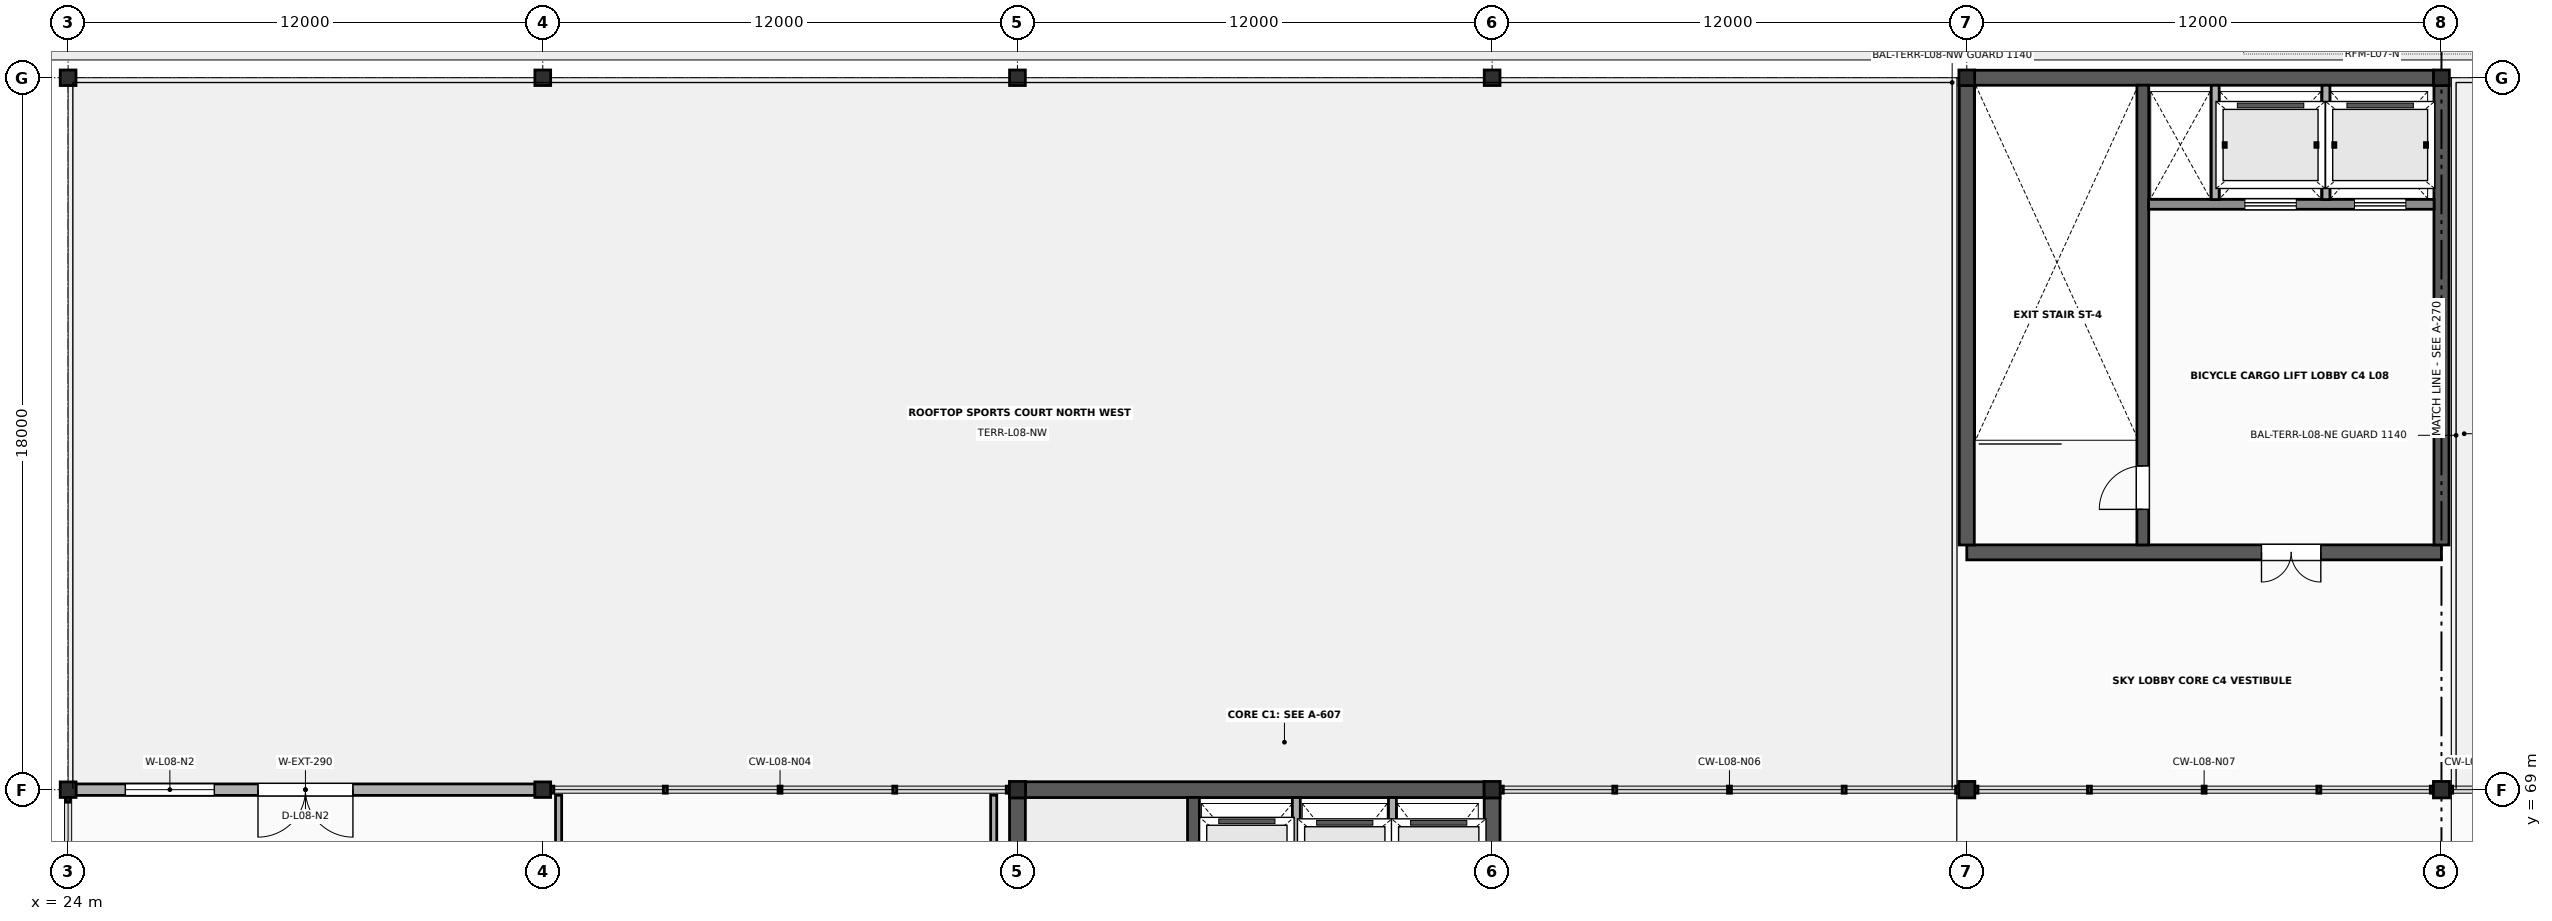
"""IFC4 building model, lengths in metres.
Left out: names, types, materials, properties, quantities, classifications, styles, units other than length and angle.
Written with IfcOpenShell. Run it as: python <this file> out.ifc"""

import sys

from ifc_helpers import new_model, si_unit, direction, frame, frame_2d, origin, origin_2d, place, context, subcontext, project, spatial, rectangle, i_section, extrude, element, fill, save


model = new_model("IFC4")
c1 = context("Model", 3, precision=1e-05, world=origin(), true_north=direction((0.0, 1.0)))
c2 = subcontext(c1, "Body", "Model", "MODEL_VIEW")
j1 = project(units=[si_unit("LENGTHUNIT", "METRE"), si_unit("PLANEANGLEUNIT", "RADIAN")], contexts=[c1])
p1 = place(None, origin())
s1 = spatial("IfcSite", under=j1, at=p1, CompositionType="ELEMENT")
p2 = place(p1, origin())
s2 = spatial("IfcBuilding", under=s1, at=p2, CompositionType="ELEMENT")
p3 = place(p2, frame((0.0, 0.0, 32.4)))
s3 = spatial("IfcBuildingStorey", under=s2, at=p3, CompositionType="ELEMENT", Elevation=32.4)
for number, where, z_axis, x_axis in (
    (1, (24.0, 69.0, 0.0), (0.0, 0.0, 1.0), (1.0, 0.0, 0.0)),
    (2, (24.0, 87.0, 0.0), (0.0, 0.0, 1.0), (1.0, 0.0, 0.0)),
    (3, (36.0, 69.0, 0.0), (0.0, 0.0, 1.0), (1.0, 0.0, 0.0)),
    (4, (36.0, 87.0, 0.0), (0.0, 0.0, 1.0), (1.0, 0.0, 0.0)),
):
    element("IfcColumn", number, at=place(p3, frame(where, z_axis=z_axis, x_axis=x_axis)), inside=s3, PredefinedType="COLUMN", context=c2, shape_type="SweptSolid", body=[
        extrude(i_section(OverallWidth=0.399, OverallDepth=0.393, WebThickness=0.023, FlangeThickness=0.037, FilletRadius=0.018, at=origin_2d()), origin(), (0.0, 0.0, 1.0), 5.2),
    ])
p4 = place(p3, frame((48.0, 69.0, 0.0), z_axis=(0.0, 0.0, 1.0), x_axis=(1.0, 0.0, 0.0)))
e5 = element("IfcColumn", 5, at=p4, inside=s3, PredefinedType="COLUMN", context=c2, shape_type="SweptSolid", body=[
    extrude(i_section(OverallWidth=0.406, OverallDepth=0.416, WebThickness=0.03, FlangeThickness=0.048, FilletRadius=0.018, at=origin_2d()), origin(), (0.0, 0.0, 1.0), 5.2),
])
p5 = place(p3, frame((48.0, 87.0, 0.0), z_axis=(0.0, 0.0, 1.0), x_axis=(1.0, 0.0, 0.0)))
e6 = element("IfcColumn", 6, at=p5, inside=s3, PredefinedType="COLUMN", context=c2, shape_type="SweptSolid", body=[
    extrude(i_section(OverallWidth=0.399, OverallDepth=0.393, WebThickness=0.023, FlangeThickness=0.037, FilletRadius=0.018, at=origin_2d()), origin(), (0.0, 0.0, 1.0), 5.2),
])
p6 = place(p3, frame((60.0, 69.0, 0.0), z_axis=(0.0, 0.0, 1.0), x_axis=(1.0, 0.0, 0.0)))
e7 = element("IfcColumn", 7, at=p6, inside=s3, PredefinedType="COLUMN", context=c2, shape_type="SweptSolid", body=[
    extrude(i_section(OverallWidth=0.406, OverallDepth=0.416, WebThickness=0.03, FlangeThickness=0.048, FilletRadius=0.018, at=origin_2d()), origin(), (0.0, 0.0, 1.0), 5.2),
])
p7 = place(p3, frame((60.0, 87.0, 0.0), z_axis=(0.0, 0.0, 1.0), x_axis=(1.0, 0.0, 0.0)))
e8 = element("IfcColumn", 8, at=p7, inside=s3, PredefinedType="COLUMN", context=c2, shape_type="SweptSolid", body=[
    extrude(i_section(OverallWidth=0.399, OverallDepth=0.393, WebThickness=0.023, FlangeThickness=0.037, FilletRadius=0.018, at=origin_2d()), origin(), (0.0, 0.0, 1.0), 5.2),
])
p8 = place(p3, frame((72.0, 69.0, 0.0), z_axis=(0.0, 0.0, 1.0), x_axis=(1.0, 0.0, 0.0)))
e9 = element("IfcColumn", 9, at=p8, inside=s3, PredefinedType="COLUMN", context=c2, shape_type="SweptSolid", body=[
    extrude(i_section(OverallWidth=0.406, OverallDepth=0.416, WebThickness=0.03, FlangeThickness=0.048, FilletRadius=0.018, at=origin_2d()), origin(), (0.0, 0.0, 1.0), 5.2),
])
p9 = place(p3, frame((72.0, 87.0, 0.0), z_axis=(0.0, 0.0, 1.0), x_axis=(1.0, 0.0, 0.0)))
e10 = element("IfcColumn", 10, at=p9, inside=s3, PredefinedType="COLUMN", context=c2, shape_type="SweptSolid", body=[
    extrude(i_section(OverallWidth=0.399, OverallDepth=0.393, WebThickness=0.023, FlangeThickness=0.037, FilletRadius=0.018, at=origin_2d()), origin(), (0.0, 0.0, 1.0), 5.2),
])
p10 = place(p3, frame((84.0, 69.0, 0.0), z_axis=(0.0, 0.0, 1.0), x_axis=(1.0, 0.0, 0.0)))
e11 = element("IfcColumn", 11, at=p10, inside=s3, PredefinedType="COLUMN", context=c2, shape_type="SweptSolid", body=[
    extrude(i_section(OverallWidth=0.406, OverallDepth=0.416, WebThickness=0.03, FlangeThickness=0.048, FilletRadius=0.018, at=origin_2d()), origin(), (0.0, 0.0, 1.0), 5.2),
])
p11 = place(p3, frame((84.0, 87.0, 0.0), z_axis=(0.0, 0.0, 1.0), x_axis=(1.0, 0.0, 0.0)))
e12 = element("IfcColumn", 12, at=p11, inside=s3, PredefinedType="COLUMN", context=c2, shape_type="SweptSolid", body=[
    extrude(i_section(OverallWidth=0.399, OverallDepth=0.393, WebThickness=0.023, FlangeThickness=0.037, FilletRadius=0.018, at=origin_2d()), origin(), (0.0, 0.0, 1.0), 5.2),
])
p12 = place(p3, frame((48.2, 69.0, 0.0), z_axis=(0.0, 0.0, 1.0), x_axis=(1.0, 0.0, 0.0)))
e13 = element("IfcWall", 13, at=p12, inside=s3, PredefinedType="SHEAR", context=c2, shape_type="SweptSolid", body=[
    extrude(rectangle(XDim=11.6, YDim=0.4, at=frame_2d((5.8, 0.0))), origin(), (0.0, 0.0, 1.0), 5.043),
])
for number, where, z_axis, x_axis in (
    (14, (48.0, 57.205, 0.0), (0.0, 0.0, 1.0), (0.0, 1.0, 0.0)),
    (15, (60.0, 57.205, 0.0), (0.0, 0.0, 1.0), (0.0, 1.0, 0.0)),
):
    element("IfcWall", number, at=place(p3, frame(where, z_axis=z_axis, x_axis=x_axis)), inside=s3, PredefinedType="SHEAR", context=c2, shape_type="SweptSolid", body=[
        extrude(rectangle(XDim=11.59, YDim=0.4, at=frame_2d((5.795, 0.0))), origin(), (0.0, 0.0, 1.0), 5.043),
    ])
p13 = place(p3, frame((52.45, 57.197, 0.0), z_axis=(0.0, 0.0, 1.0), x_axis=(0.0, 1.0, 0.0)))
e16 = element("IfcWall", 16, at=p13, inside=s3, PredefinedType="SHEAR", context=c2, shape_type="SweptSolid", body=[
    extrude(rectangle(XDim=11.606, YDim=0.3, at=frame_2d((5.803, 0.0))), origin(), (0.0, 0.0, 1.0), 5.043),
])
p14 = place(p13, frame((0.9, 0.0, 0.0)))
e17 = element("IfcOpeningElement", 17, at=p14, cuts=e16, PredefinedType="OPENING", context=c2, shape_type="SweptSolid", body=[
    extrude(rectangle(XDim=1.1, YDim=2.2, at=frame_2d((0.55, 1.1))), frame((0.0, 0.165, 0.0), z_axis=(0.0, -1.0, 0.0), x_axis=(1.0, 0.0, 0.0)), (0.0, 0.0, 1.0), 0.33),
])
for number, where, z_axis, x_axis in (
    (18, (55.05, 65.92, 0.0), (0.0, 0.0, 1.0), (0.0, 1.0, 0.0)),
    (19, (57.48, 65.92, 0.0), (0.0, 0.0, 1.0), (0.0, 1.0, 0.0)),
):
    element("IfcWall", number, at=place(p3, frame(where, z_axis=z_axis, x_axis=x_axis)), inside=s3, PredefinedType="SOLIDWALL", context=c2, shape_type="SweptSolid", body=[
        extrude(rectangle(XDim=2.88, YDim=0.2, at=frame_2d((1.44, 0.0))), origin(), (0.0, 0.0, 1.0), 5.033),
    ])
p15 = place(p3, frame((72.0, 75.0, 0.0), z_axis=(0.0, 0.0, 1.0), x_axis=(1.0, 0.0, 0.0)))
e20 = element("IfcWall", 20, at=p15, inside=s3, PredefinedType="SHEAR", context=c2, shape_type="SweptSolid", body=[
    extrude(rectangle(XDim=12.0, YDim=0.38, at=frame_2d((6.0, 0.0))), origin(), (0.0, 0.0, 1.0), 4.973),
])
p16 = place(p15, frame((7.45, 0.0, 0.0)))
e21 = element("IfcOpeningElement", 21, at=p16, cuts=e20, PredefinedType="OPENING", context=c2, shape_type="SweptSolid", body=[
    extrude(rectangle(XDim=1.5, YDim=2.25, at=frame_2d((0.75, 1.125))), frame((0.0, 0.205, 0.0), z_axis=(0.0, -1.0, 0.0), x_axis=(1.0, 0.0, 0.0)), (0.0, 0.0, 1.0), 0.41),
])
p17 = place(p3, frame((72.197, 87.0, 0.0), z_axis=(0.0, 0.0, 1.0), x_axis=(1.0, 0.0, 0.0)))
e22 = element("IfcWall", 22, at=p17, inside=s3, PredefinedType="SHEAR", context=c2, shape_type="SweptSolid", body=[
    extrude(rectangle(XDim=11.607, YDim=0.38, at=frame_2d((5.803, 0.0))), origin(), (0.0, 0.0, 1.0), 4.973),
])
for number, where, z_axis, x_axis in (
    (23, (72.0, 75.187, 0.0), (0.0, 0.0, 1.0), (0.0, 1.0, 0.0)),
    (24, (84.0, 75.187, 0.0), (0.0, 0.0, 1.0), (0.0, 1.0, 0.0)),
):
    element("IfcWall", number, at=place(p3, frame(where, z_axis=z_axis, x_axis=x_axis)), inside=s3, PredefinedType="SHEAR", context=c2, shape_type="SweptSolid", body=[
        extrude(rectangle(XDim=11.619, YDim=0.38, at=frame_2d((5.81, 0.0))), origin(), (0.0, 0.0, 1.0), 4.973),
    ])
p18 = place(p3, frame((76.45, 75.187, 0.0), z_axis=(0.0, 0.0, 1.0), x_axis=(0.0, 1.0, 0.0)))
e25 = element("IfcWall", 25, at=p18, inside=s3, PredefinedType="SHEAR", context=c2, shape_type="SweptSolid", body=[
    extrude(rectangle(XDim=11.626, YDim=0.3, at=frame_2d((5.813, 0.0))), origin(), (0.0, 0.0, 1.0), 4.973),
])
p19 = place(p18, frame((0.9, 0.0, 0.0)))
e26 = element("IfcOpeningElement", 26, at=p19, cuts=e25, PredefinedType="OPENING", context=c2, shape_type="SweptSolid", body=[
    extrude(rectangle(XDim=1.1, YDim=2.2, at=frame_2d((0.55, 1.1))), frame((0.0, 0.165, 0.0), z_axis=(0.0, -1.0, 0.0), x_axis=(1.0, 0.0, 0.0)), (0.0, 0.0, 1.0), 0.33),
])
p20 = place(p3, frame((76.597, 83.8, 0.0), z_axis=(0.0, 0.0, 1.0), x_axis=(1.0, 0.0, 0.0)))
e27 = element("IfcWall", 27, at=p20, inside=s3, PredefinedType="SOLIDWALL", context=c2, shape_type="SweptSolid", body=[
    extrude(rectangle(XDim=7.216, YDim=0.25, at=frame_2d((3.608, 0.0))), origin(), (0.0, 0.0, 1.0), 4.973),
])
p21 = place(p20, frame((2.433, 0.0, 0.0)))
e28 = element("IfcOpeningElement", 28, at=p21, cuts=e27, PredefinedType="OPENING", context=c2, shape_type="SweptSolid", body=[
    extrude(rectangle(XDim=1.3, YDim=2.28, at=frame_2d((0.65, 1.14))), frame((0.0, 0.14, 0.0), z_axis=(0.0, -1.0, 0.0), x_axis=(1.0, 0.0, 0.0)), (0.0, 0.0, 1.0), 0.28),
])
p22 = place(p20, frame((5.203, 0.0, 0.0)))
e29 = element("IfcOpeningElement", 29, at=p22, cuts=e27, PredefinedType="OPENING", context=c2, shape_type="SweptSolid", body=[
    extrude(rectangle(XDim=1.3, YDim=2.28, at=frame_2d((0.65, 1.14))), frame((0.0, 0.14, 0.0), z_axis=(0.0, -1.0, 0.0), x_axis=(1.0, 0.0, 0.0)), (0.0, 0.0, 1.0), 0.28),
])
for number, where, z_axis, x_axis in (
    (30, (78.28, 83.92, 0.0), (0.0, 0.0, 1.0), (0.0, 1.0, 0.0)),
    (31, (81.08, 83.92, 0.0), (0.0, 0.0, 1.0), (0.0, 1.0, 0.0)),
):
    element("IfcWall", number, at=place(p3, frame(where, z_axis=z_axis, x_axis=x_axis)), inside=s3, PredefinedType="SOLIDWALL", context=c2, shape_type="SweptSolid", body=[
        extrude(rectangle(XDim=2.89, YDim=0.2, at=frame_2d((1.445, 0.0))), origin(), (0.0, 0.0, 1.0), 4.963),
    ])
p23 = place(p3, frame((24.198, 69.0, 0.0), z_axis=(0.0, 0.0, 1.0), x_axis=(1.0, 0.0, 0.0)))
e32 = element("IfcWall", 32, at=p23, inside=s3, PredefinedType="SOLIDWALL", context=c2, shape_type="SweptSolid", body=[
    extrude(rectangle(XDim=11.605, YDim=0.29, at=frame_2d((5.802, 0.0))), origin(), (0.0, 0.0, 1.0), 4.1),
])
p24 = place(p23, frame((4.603, 0.0, 0.0)))
e33 = element("IfcOpeningElement", 33, at=p24, cuts=e32, PredefinedType="OPENING", context=c2, shape_type="SweptSolid", body=[
    extrude(rectangle(XDim=2.4, YDim=2.54, at=frame_2d((1.2, 1.27))), frame((0.0, 0.16, 0.0), z_axis=(0.0, -1.0, 0.0), x_axis=(1.0, 0.0, 0.0)), (0.0, 0.0, 1.0), 0.32),
])
p25 = place(p23, frame((1.25, 0.0, 1.95)))
e34 = element("IfcOpeningElement", 34, at=p25, cuts=e32, PredefinedType="OPENING", context=c2, shape_type="SweptSolid", body=[
    extrude(rectangle(XDim=2.25, YDim=0.88, at=frame_2d((1.125, 0.44))), frame((0.0, 0.16, 0.0), z_axis=(0.0, -1.0, 0.0), x_axis=(1.0, 0.0, 0.0)), (0.0, 0.0, 1.0), 0.32),
])
for number, where, z_axis, x_axis in (
    (35, (36.4, 57.36, 0.0), (0.0, 0.0, 1.0), (0.0, 1.0, 0.0)),
    (36, (47.4, 57.36, 0.0), (0.0, 0.0, 1.0), (0.0, 1.0, 0.0)),
):
    element("IfcWall", number, at=place(p3, frame(where, z_axis=z_axis, x_axis=x_axis)), inside=s3, PredefinedType="PLUMBINGWALL", context=c2, shape_type="SweptSolid", body=[
        extrude(rectangle(XDim=11.5, YDim=0.155, at=frame_2d((5.75, 0.0))), origin(), (0.0, 0.0, 1.0), 2.88),
    ])
p26 = place(p24, origin())
e37 = element("IfcDoor", 37, at=p26, inside=s3, OperationType="DOUBLE_DOOR_SINGLE_SWING", PredefinedType="DOOR", context=c2, shape_type="SweptSolid", body=[
    extrude(rectangle(XDim=2.4, YDim=2.54, at=frame_2d((1.2, 1.27))), frame((0.0, 0.025, 0.0), z_axis=(0.0, -1.0, 0.0), x_axis=(1.0, 0.0, 0.0)), (0.0, 0.0, 1.0), 0.05),
])
fill(e33, e37)
p27 = place(p25, origin())
e38 = element("IfcWindow", 38, at=p27, inside=s3, PartitioningType="DOUBLE_PANEL_VERTICAL", PredefinedType="USERDEFINED", context=c2, shape_type="SweptSolid", body=[
    extrude(rectangle(XDim=2.25, YDim=0.88, at=frame_2d((1.125, 0.44))), frame((0.0, 0.03, 0.0), z_axis=(0.0, -1.0, 0.0), x_axis=(1.0, 0.0, 0.0)), (0.0, 0.0, 1.0), 0.06),
])
fill(e34, e38)
p28 = place(p19, origin())
e39 = element("IfcDoor", 39, at=p28, inside=s3, OperationType="SINGLE_SWING_LEFT", PredefinedType="DOOR", context=c2, shape_type="SweptSolid", body=[
    extrude(rectangle(XDim=1.1, YDim=2.2, at=frame_2d((0.55, 1.1))), frame((0.0, 0.025, 0.0), z_axis=(0.0, -1.0, 0.0), x_axis=(1.0, 0.0, 0.0)), (0.0, 0.0, 1.0), 0.05),
])
fill(e26, e39)
p29 = place(p16, origin())
e40 = element("IfcDoor", 40, at=p29, inside=s3, OperationType="DOUBLE_DOOR_SINGLE_SWING", PredefinedType="DOOR", context=c2, shape_type="SweptSolid", body=[
    extrude(rectangle(XDim=1.5, YDim=2.25, at=frame_2d((0.75, 1.125))), frame((0.0, 0.025, 0.0), z_axis=(0.0, -1.0, 0.0), x_axis=(1.0, 0.0, 0.0)), (0.0, 0.0, 1.0), 0.05),
])
fill(e21, e40)
p30 = place(p21, origin())
e41 = element("IfcDoor", 41, at=p30, inside=s3, OperationType="SLIDING_TO_LEFT", PredefinedType="USERDEFINED", context=c2, shape_type="SweptSolid", body=[
    extrude(rectangle(XDim=1.3, YDim=2.28, at=frame_2d((0.65, 1.14))), frame((0.0, 0.025, 0.0), z_axis=(0.0, -1.0, 0.0), x_axis=(1.0, 0.0, 0.0)), (0.0, 0.0, 1.0), 0.05),
])
fill(e28, e41)
p31 = place(p22, origin())
e42 = element("IfcDoor", 42, at=p31, inside=s3, OperationType="SLIDING_TO_LEFT", PredefinedType="USERDEFINED", context=c2, shape_type="SweptSolid", body=[
    extrude(rectangle(XDim=1.3, YDim=2.28, at=frame_2d((0.65, 1.14))), frame((0.0, 0.025, 0.0), z_axis=(0.0, -1.0, 0.0), x_axis=(1.0, 0.0, 0.0)), (0.0, 0.0, 1.0), 0.05),
])
fill(e29, e42)
save(model, sys.argv[1])
